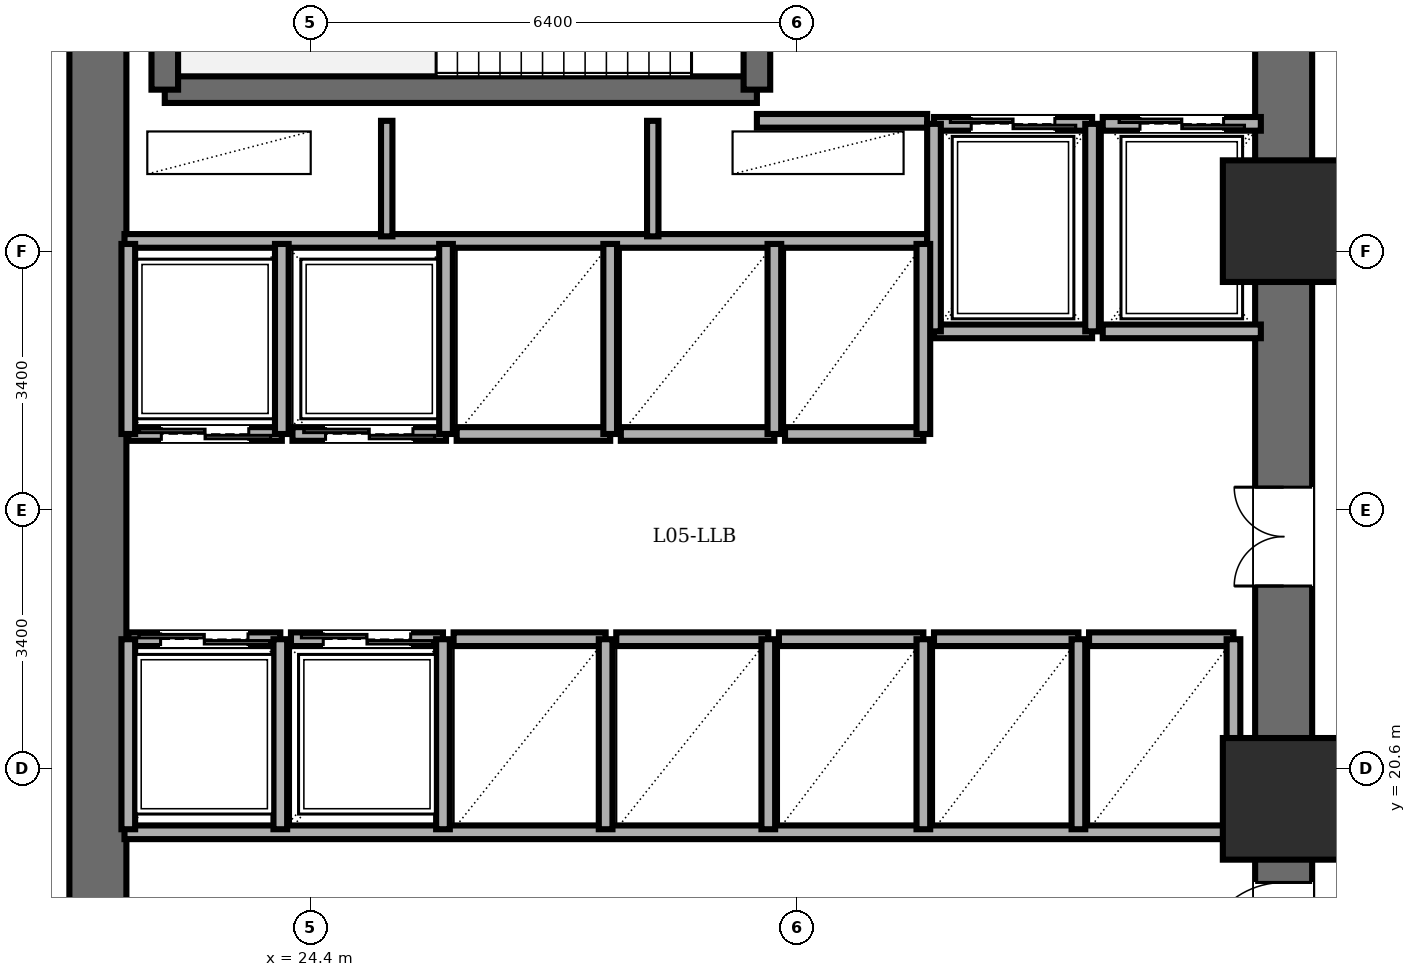
"""IFC4 building model, lengths in metres.
Left out: names, types, materials, properties, quantities, classifications, styles, units other than length and angle.
Written with IfcOpenShell. Run it as: python <this file> out.ifc"""

import sys

from ifc_helpers import new_model, si_unit, direction, frame, frame_2d, origin, origin_2d, place, context, subcontext, project, spatial, rectangle, extrude, element, fill, save


model = new_model("IFC4")
c1 = context("Model", 3, precision=1e-05, world=origin(), true_north=direction((0.0, 1.0)))
c2 = subcontext(c1, "Body", "Model", "MODEL_VIEW")
j1 = project(units=[si_unit("LENGTHUNIT", "METRE"), si_unit("PLANEANGLEUNIT", "RADIAN")], contexts=[c1])
p1 = place(None, origin())
s1 = spatial("IfcSite", under=j1, at=p1, CompositionType="ELEMENT")
p2 = place(p1, origin())
s2 = spatial("IfcBuilding", under=s1, at=p2, CompositionType="ELEMENT")
p3 = place(p2, frame((0.0, 0.0, 19.35)))
s3 = spatial("IfcBuildingStorey", under=s2, at=p3, CompositionType="ELEMENT", Elevation=19.35)
for number, where, z_axis, x_axis in (
    (1, (37.2, 20.2, 0.0), (0.0, 0.0, 1.0), (1.0, 0.0, 0.0)),
    (2, (37.2, 27.8, 0.0), (0.0, 0.0, 1.0), (1.0, 0.0, 0.0)),
):
    element("IfcColumn", number, at=place(p3, frame(where, z_axis=z_axis, x_axis=x_axis)), inside=s3, PredefinedType="COLUMN", context=c2, shape_type="SweptSolid", body=[
        extrude(rectangle(XDim=1.6, YDim=1.6, at=origin_2d()), origin(), (0.0, 0.0, 1.0), 4.65),
    ])
p4 = place(p3, frame((21.6, 14.4, 0.0), z_axis=(0.0, 0.0, 1.0), x_axis=(0.0, 1.0, 0.0)))
e3 = element("IfcWall", 3, at=p4, inside=s3, PredefinedType="SHEAR", context=c2, shape_type="SweptSolid", body=[
    extrude(rectangle(XDim=19.2, YDim=0.75, at=frame_2d((9.6, 0.0))), origin(), (0.0, 0.0, 1.0), 4.41),
])
p5 = place(p3, frame((37.2, 14.4, 0.0), z_axis=(0.0, 0.0, 1.0), x_axis=(0.0, 1.0, 0.0)))
e4 = element("IfcWall", 4, at=p5, inside=s3, PredefinedType="SHEAR", context=c2, shape_type="SweptSolid", body=[
    extrude(rectangle(XDim=19.2, YDim=0.75, at=frame_2d((9.6, 0.0))), origin(), (0.0, 0.0, 1.0), 4.41),
])
p6 = place(p5, frame((15.8, 0.0, 0.0)))
e5 = element("IfcOpeningElement", 5, at=p6, cuts=e4, PredefinedType="OPENING", context=c2, shape_type="SweptSolid", body=[
    extrude(rectangle(XDim=1.15, YDim=2.15, at=frame_2d((0.575, 1.075))), frame((0.0, 0.385, 0.0), z_axis=(0.0, -1.0, 0.0), x_axis=(1.0, 0.0, 0.0)), (0.0, 0.0, 1.0), 0.77),
])
p7 = place(p5, frame((3.6, 0.0, 0.0)))
e6 = element("IfcOpeningElement", 6, at=p7, cuts=e4, PredefinedType="OPENING", context=c2, shape_type="SweptSolid", body=[
    extrude(rectangle(XDim=1.1, YDim=2.15, at=frame_2d((0.55, 1.075))), frame((0.0, 0.385, 0.0), z_axis=(0.0, -1.0, 0.0), x_axis=(1.0, 0.0, 0.0)), (0.0, 0.0, 1.0), 0.77),
])
p8 = place(p5, frame((8.6, 0.0, 0.0)))
e7 = element("IfcOpeningElement", 7, at=p8, cuts=e4, PredefinedType="OPENING", context=c2, shape_type="SweptSolid", body=[
    extrude(rectangle(XDim=1.3, YDim=2.2, at=frame_2d((0.65, 1.1))), frame((0.0, 0.385, 0.0), z_axis=(0.0, -1.0, 0.0), x_axis=(1.0, 0.0, 0.0)), (0.0, 0.0, 1.0), 0.77),
])
p9 = place(p3, frame((22.48, 29.53, 0.0), z_axis=(0.0, 0.0, 1.0), x_axis=(1.0, 0.0, 0.0)))
e8 = element("IfcWall", 8, at=p9, inside=s3, PredefinedType="SOLIDWALL", context=c2, shape_type="SweptSolid", body=[
    extrude(rectangle(XDim=7.79, YDim=0.35, at=frame_2d((3.895, 0.0))), origin(), (0.0, 0.0, 1.0), 4.41),
])
p10 = place(p3, frame((22.48, 29.53, 0.0), z_axis=(0.0, 0.0, 1.0), x_axis=(0.0, 1.0, 0.0)))
e9 = element("IfcWall", 9, at=p10, inside=s3, PredefinedType="SOLIDWALL", context=c2, shape_type="SweptSolid", body=[
    extrude(rectangle(XDim=3.58, YDim=0.35, at=frame_2d((1.79, 0.0))), origin(), (0.0, 0.0, 1.0), 4.41),
])
p11 = place(p3, frame((30.27, 29.53, 0.0), z_axis=(0.0, 0.0, 1.0), x_axis=(0.0, 1.0, 0.0)))
e10 = element("IfcWall", 10, at=p11, inside=s3, PredefinedType="SOLIDWALL", context=c2, shape_type="SweptSolid", body=[
    extrude(rectangle(XDim=3.58, YDim=0.35, at=frame_2d((1.79, 0.0))), origin(), (0.0, 0.0, 1.0), 4.41),
])
p12 = place(p11, frame((1.25, 0.0, 0.0)))
e11 = element("IfcOpeningElement", 11, at=p12, cuts=e10, PredefinedType="OPENING", context=c2, shape_type="SweptSolid", body=[
    extrude(rectangle(XDim=1.1, YDim=2.15, at=frame_2d((0.55, 1.075))), frame((0.0, 0.185, 0.0), z_axis=(0.0, -1.0, 0.0), x_axis=(1.0, 0.0, 0.0)), (0.0, 0.0, 1.0), 0.37),
])
p13 = place(p3, frame((30.27, 29.12, 0.0), z_axis=(0.0, 0.0, 1.0), x_axis=(1.0, 0.0, 0.0)))
e12 = element("IfcWall", 12, at=p13, inside=s3, PredefinedType="PARTITIONING", context=c2, shape_type="SweptSolid", body=[
    extrude(rectangle(XDim=2.24, YDim=0.18, at=frame_2d((1.12, 0.0))), origin(), (0.0, 0.0, 1.0), 4.41),
])
p14 = place(p3, frame((21.95, 27.54, 0.0), z_axis=(0.0, 0.0, 1.0), x_axis=(1.0, 0.0, 0.0)))
e13 = element("IfcWall", 13, at=p14, inside=s3, PredefinedType="PARTITIONING", context=c2, shape_type="SweptSolid", body=[
    extrude(rectangle(XDim=10.56, YDim=0.18, at=frame_2d((5.28, 0.0))), origin(), (0.0, 0.0, 1.0), 4.41),
])
for number, where, z_axis, x_axis in (
    (14, (25.4, 27.6, 0.0), (0.0, 0.0, 1.0), (0.0, 1.0, 0.0)),
    (15, (28.9, 27.6, 0.0), (0.0, 0.0, 1.0), (0.0, 1.0, 0.0)),
):
    element("IfcWall", number, at=place(p3, frame(where, z_axis=z_axis, x_axis=x_axis)), inside=s3, PredefinedType="PARTITIONING", context=c2, shape_type="SweptSolid", body=[
        extrude(rectangle(XDim=1.52, YDim=0.15, at=frame_2d((0.76, 0.0))), origin(), (0.0, 0.0, 1.0), 4.41),
    ])
p15 = place(p3, frame((21.95, 19.76, 0.0), z_axis=(0.0, 0.0, 1.0), x_axis=(1.0, 0.0, 0.0)))
e16 = element("IfcWall", 16, at=p15, inside=s3, PredefinedType="PARTITIONING", context=c2, shape_type="SweptSolid", body=[
    extrude(rectangle(XDim=14.87, YDim=0.18, at=frame_2d((7.435, 0.0))), origin(), (0.0, 0.0, 1.0), 4.41),
])
p16 = place(p3, frame((32.6, 29.08, 0.0), z_axis=(0.0, 0.0, 1.0), x_axis=(1.0, 0.0, 0.0)))
e17 = element("IfcWall", 17, at=p16, inside=s3, PredefinedType="PARTITIONING", context=c2, shape_type="SweptSolid", body=[
    extrude(rectangle(XDim=2.08, YDim=0.18, at=frame_2d((1.04, 0.0))), origin(), (0.0, 0.0, 1.0), 4.41),
])
p17 = place(p16, frame((0.49, 0.0, 0.0)))
e18 = element("IfcOpeningElement", 18, at=p17, cuts=e17, PredefinedType="OPENING", context=c2, shape_type="SweptSolid", body=[
    extrude(rectangle(XDim=1.1, YDim=2.2, at=frame_2d((0.55, 1.1))), frame((0.0, 0.1, 0.0), z_axis=(0.0, -1.0, 0.0), x_axis=(1.0, 0.0, 0.0)), (0.0, 0.0, 1.0), 0.2),
])
p18 = place(p3, frame((34.68, 26.35, 0.0), z_axis=(0.0, 0.0, 1.0), x_axis=(-1.0, 0.0, 0.0)))
e19 = element("IfcWall", 19, at=p18, inside=s3, PredefinedType="PARTITIONING", context=c2, shape_type="SweptSolid", body=[
    extrude(rectangle(XDim=2.08, YDim=0.18, at=frame_2d((1.04, 0.0))), origin(), (0.0, 0.0, 1.0), 4.41),
])
for number, where, z_axis, x_axis in (
    (20, (34.68, 26.35, 0.0), (0.0, 0.0, 1.0), (0.0, 1.0, 0.0)),
    (21, (32.6, 29.08, 0.0), (0.0, 0.0, 1.0), (0.0, -1.0, 0.0)),
):
    element("IfcWall", number, at=place(p3, frame(where, z_axis=z_axis, x_axis=x_axis)), inside=s3, PredefinedType="PARTITIONING", context=c2, shape_type="SweptSolid", body=[
        extrude(rectangle(XDim=2.73, YDim=0.18, at=frame_2d((1.365, 0.0))), origin(), (0.0, 0.0, 1.0), 4.41),
    ])
p19 = place(p3, frame((34.82, 29.08, 0.0), z_axis=(0.0, 0.0, 1.0), x_axis=(1.0, 0.0, 0.0)))
e22 = element("IfcWall", 22, at=p19, inside=s3, PredefinedType="PARTITIONING", context=c2, shape_type="SweptSolid", body=[
    extrude(rectangle(XDim=2.08, YDim=0.18, at=frame_2d((1.04, 0.0))), origin(), (0.0, 0.0, 1.0), 4.41),
])
p20 = place(p19, frame((0.49, 0.0, 0.0)))
e23 = element("IfcOpeningElement", 23, at=p20, cuts=e22, PredefinedType="OPENING", context=c2, shape_type="SweptSolid", body=[
    extrude(rectangle(XDim=1.1, YDim=2.2, at=frame_2d((0.55, 1.1))), frame((0.0, 0.1, 0.0), z_axis=(0.0, -1.0, 0.0), x_axis=(1.0, 0.0, 0.0)), (0.0, 0.0, 1.0), 0.2),
])
p21 = place(p3, frame((36.9, 26.35, 0.0), z_axis=(0.0, 0.0, 1.0), x_axis=(-1.0, 0.0, 0.0)))
e24 = element("IfcWall", 24, at=p21, inside=s3, PredefinedType="PARTITIONING", context=c2, shape_type="SweptSolid", body=[
    extrude(rectangle(XDim=2.08, YDim=0.18, at=frame_2d((1.04, 0.0))), origin(), (0.0, 0.0, 1.0), 4.41),
])
p22 = place(p3, frame((24.02, 25.0, 0.0), z_axis=(0.0, 0.0, 1.0), x_axis=(-1.0, 0.0, 0.0)))
e25 = element("IfcWall", 25, at=p22, inside=s3, PredefinedType="PARTITIONING", context=c2, shape_type="SweptSolid", body=[
    extrude(rectangle(XDim=2.02, YDim=0.18, at=frame_2d((1.01, 0.0))), origin(), (0.0, 0.0, 1.0), 4.41),
])
p23 = place(p22, frame((0.435, 0.0, 0.0)))
e26 = element("IfcOpeningElement", 26, at=p23, cuts=e25, PredefinedType="OPENING", context=c2, shape_type="SweptSolid", body=[
    extrude(rectangle(XDim=1.15, YDim=2.2, at=frame_2d((0.575, 1.1))), frame((0.0, 0.1, 0.0), z_axis=(0.0, -1.0, 0.0), x_axis=(1.0, 0.0, 0.0)), (0.0, 0.0, 1.0), 0.2),
])
for number, where, z_axis, x_axis in (
    (27, (24.02, 25.0, 0.0), (0.0, 0.0, 1.0), (0.0, 1.0, 0.0)),
    (28, (22.0, 27.5, 0.0), (0.0, 0.0, 1.0), (0.0, -1.0, 0.0)),
):
    element("IfcWall", number, at=place(p3, frame(where, z_axis=z_axis, x_axis=x_axis)), inside=s3, PredefinedType="PARTITIONING", context=c2, shape_type="SweptSolid", body=[
        extrude(rectangle(XDim=2.5, YDim=0.18, at=frame_2d((1.25, 0.0))), origin(), (0.0, 0.0, 1.0), 4.41),
    ])
p24 = place(p3, frame((26.18, 25.0, 0.0), z_axis=(0.0, 0.0, 1.0), x_axis=(-1.0, 0.0, 0.0)))
e29 = element("IfcWall", 29, at=p24, inside=s3, PredefinedType="PARTITIONING", context=c2, shape_type="SweptSolid", body=[
    extrude(rectangle(XDim=2.02, YDim=0.18, at=frame_2d((1.01, 0.0))), origin(), (0.0, 0.0, 1.0), 4.41),
])
p25 = place(p24, frame((0.435, 0.0, 0.0)))
e30 = element("IfcOpeningElement", 30, at=p25, cuts=e29, PredefinedType="OPENING", context=c2, shape_type="SweptSolid", body=[
    extrude(rectangle(XDim=1.15, YDim=2.2, at=frame_2d((0.575, 1.1))), frame((0.0, 0.1, 0.0), z_axis=(0.0, -1.0, 0.0), x_axis=(1.0, 0.0, 0.0)), (0.0, 0.0, 1.0), 0.2),
])
p26 = place(p3, frame((26.18, 25.0, 0.0), z_axis=(0.0, 0.0, 1.0), x_axis=(0.0, 1.0, 0.0)))
e31 = element("IfcWall", 31, at=p26, inside=s3, PredefinedType="PARTITIONING", context=c2, shape_type="SweptSolid", body=[
    extrude(rectangle(XDim=2.5, YDim=0.18, at=frame_2d((1.25, 0.0))), origin(), (0.0, 0.0, 1.0), 4.41),
])
p27 = place(p3, frame((22.0, 22.3, 0.0), z_axis=(0.0, 0.0, 1.0), x_axis=(1.0, 0.0, 0.0)))
e32 = element("IfcWall", 32, at=p27, inside=s3, PredefinedType="PARTITIONING", context=c2, shape_type="SweptSolid", body=[
    extrude(rectangle(XDim=2.0, YDim=0.18, at=frame_2d((1.0, 0.0))), origin(), (0.0, 0.0, 1.0), 4.41),
])
p28 = place(p27, frame((0.425, 0.0, 0.0)))
e33 = element("IfcOpeningElement", 33, at=p28, cuts=e32, PredefinedType="OPENING", context=c2, shape_type="SweptSolid", body=[
    extrude(rectangle(XDim=1.15, YDim=2.2, at=frame_2d((0.575, 1.1))), frame((0.0, 0.1, 0.0), z_axis=(0.0, -1.0, 0.0), x_axis=(1.0, 0.0, 0.0)), (0.0, 0.0, 1.0), 0.2),
])
for number, where, z_axis, x_axis in (
    (34, (24.0, 19.8, 0.0), (0.0, 0.0, 1.0), (0.0, 1.0, 0.0)),
    (35, (22.0, 22.3, 0.0), (0.0, 0.0, 1.0), (0.0, -1.0, 0.0)),
):
    element("IfcWall", number, at=place(p3, frame(where, z_axis=z_axis, x_axis=x_axis)), inside=s3, PredefinedType="PARTITIONING", context=c2, shape_type="SweptSolid", body=[
        extrude(rectangle(XDim=2.5, YDim=0.18, at=frame_2d((1.25, 0.0))), origin(), (0.0, 0.0, 1.0), 4.41),
    ])
p29 = place(p3, frame((24.14, 22.3, 0.0), z_axis=(0.0, 0.0, 1.0), x_axis=(1.0, 0.0, 0.0)))
e36 = element("IfcWall", 36, at=p29, inside=s3, PredefinedType="PARTITIONING", context=c2, shape_type="SweptSolid", body=[
    extrude(rectangle(XDim=2.0, YDim=0.18, at=frame_2d((1.0, 0.0))), origin(), (0.0, 0.0, 1.0), 4.41),
])
p30 = place(p29, frame((0.425, 0.0, 0.0)))
e37 = element("IfcOpeningElement", 37, at=p30, cuts=e36, PredefinedType="OPENING", context=c2, shape_type="SweptSolid", body=[
    extrude(rectangle(XDim=1.15, YDim=2.2, at=frame_2d((0.575, 1.1))), frame((0.0, 0.1, 0.0), z_axis=(0.0, -1.0, 0.0), x_axis=(1.0, 0.0, 0.0)), (0.0, 0.0, 1.0), 0.2),
])
p31 = place(p3, frame((26.14, 19.8, 0.0), z_axis=(0.0, 0.0, 1.0), x_axis=(0.0, 1.0, 0.0)))
e38 = element("IfcWall", 38, at=p31, inside=s3, PredefinedType="PARTITIONING", context=c2, shape_type="SweptSolid", body=[
    extrude(rectangle(XDim=2.5, YDim=0.18, at=frame_2d((1.25, 0.0))), origin(), (0.0, 0.0, 1.0), 4.41),
])
p32 = place(p3, frame((28.34, 25.0, 0.0), z_axis=(0.0, 0.0, 1.0), x_axis=(-1.0, 0.0, 0.0)))
e39 = element("IfcWall", 39, at=p32, inside=s3, PredefinedType="PARTITIONING", context=c2, shape_type="SweptSolid", body=[
    extrude(rectangle(XDim=2.02, YDim=0.18, at=frame_2d((1.01, 0.0))), origin(), (0.0, 0.0, 1.0), 4.41),
])
p33 = place(p3, frame((28.34, 25.0, 0.0), z_axis=(0.0, 0.0, 1.0), x_axis=(0.0, 1.0, 0.0)))
e40 = element("IfcWall", 40, at=p33, inside=s3, PredefinedType="PARTITIONING", context=c2, shape_type="SweptSolid", body=[
    extrude(rectangle(XDim=2.5, YDim=0.18, at=frame_2d((1.25, 0.0))), origin(), (0.0, 0.0, 1.0), 4.41),
])
p34 = place(p3, frame((30.5, 25.0, 0.0), z_axis=(0.0, 0.0, 1.0), x_axis=(-1.0, 0.0, 0.0)))
e41 = element("IfcWall", 41, at=p34, inside=s3, PredefinedType="PARTITIONING", context=c2, shape_type="SweptSolid", body=[
    extrude(rectangle(XDim=2.02, YDim=0.18, at=frame_2d((1.01, 0.0))), origin(), (0.0, 0.0, 1.0), 4.41),
])
p35 = place(p3, frame((30.5, 25.0, 0.0), z_axis=(0.0, 0.0, 1.0), x_axis=(0.0, 1.0, 0.0)))
e42 = element("IfcWall", 42, at=p35, inside=s3, PredefinedType="PARTITIONING", context=c2, shape_type="SweptSolid", body=[
    extrude(rectangle(XDim=2.5, YDim=0.18, at=frame_2d((1.25, 0.0))), origin(), (0.0, 0.0, 1.0), 4.41),
])
p36 = place(p3, frame((26.28, 22.3, 0.0), z_axis=(0.0, 0.0, 1.0), x_axis=(1.0, 0.0, 0.0)))
e43 = element("IfcWall", 43, at=p36, inside=s3, PredefinedType="PARTITIONING", context=c2, shape_type="SweptSolid", body=[
    extrude(rectangle(XDim=2.0, YDim=0.18, at=frame_2d((1.0, 0.0))), origin(), (0.0, 0.0, 1.0), 4.41),
])
p37 = place(p3, frame((28.28, 19.8, 0.0), z_axis=(0.0, 0.0, 1.0), x_axis=(0.0, 1.0, 0.0)))
e44 = element("IfcWall", 44, at=p37, inside=s3, PredefinedType="PARTITIONING", context=c2, shape_type="SweptSolid", body=[
    extrude(rectangle(XDim=2.5, YDim=0.18, at=frame_2d((1.25, 0.0))), origin(), (0.0, 0.0, 1.0), 4.41),
])
p38 = place(p3, frame((28.42, 22.3, 0.0), z_axis=(0.0, 0.0, 1.0), x_axis=(1.0, 0.0, 0.0)))
e45 = element("IfcWall", 45, at=p38, inside=s3, PredefinedType="PARTITIONING", context=c2, shape_type="SweptSolid", body=[
    extrude(rectangle(XDim=2.0, YDim=0.18, at=frame_2d((1.0, 0.0))), origin(), (0.0, 0.0, 1.0), 4.41),
])
p39 = place(p3, frame((30.42, 19.8, 0.0), z_axis=(0.0, 0.0, 1.0), x_axis=(0.0, 1.0, 0.0)))
e46 = element("IfcWall", 46, at=p39, inside=s3, PredefinedType="PARTITIONING", context=c2, shape_type="SweptSolid", body=[
    extrude(rectangle(XDim=2.5, YDim=0.18, at=frame_2d((1.25, 0.0))), origin(), (0.0, 0.0, 1.0), 4.41),
])
p40 = place(p3, frame((32.46, 25.0, 0.0), z_axis=(0.0, 0.0, 1.0), x_axis=(-1.0, 0.0, 0.0)))
e47 = element("IfcWall", 47, at=p40, inside=s3, PredefinedType="PARTITIONING", context=c2, shape_type="SweptSolid", body=[
    extrude(rectangle(XDim=1.82, YDim=0.18, at=frame_2d((0.91, 0.0))), origin(), (0.0, 0.0, 1.0), 4.41),
])
p41 = place(p3, frame((32.46, 25.0, 0.0), z_axis=(0.0, 0.0, 1.0), x_axis=(0.0, 1.0, 0.0)))
e48 = element("IfcWall", 48, at=p41, inside=s3, PredefinedType="PARTITIONING", context=c2, shape_type="SweptSolid", body=[
    extrude(rectangle(XDim=2.5, YDim=0.18, at=frame_2d((1.25, 0.0))), origin(), (0.0, 0.0, 1.0), 4.41),
])
p42 = place(p3, frame((30.56, 22.3, 0.0), z_axis=(0.0, 0.0, 1.0), x_axis=(1.0, 0.0, 0.0)))
e49 = element("IfcWall", 49, at=p42, inside=s3, PredefinedType="PARTITIONING", context=c2, shape_type="SweptSolid", body=[
    extrude(rectangle(XDim=1.9, YDim=0.18, at=frame_2d((0.95, 0.0))), origin(), (0.0, 0.0, 1.0), 4.41),
])
p43 = place(p3, frame((32.46, 19.8, 0.0), z_axis=(0.0, 0.0, 1.0), x_axis=(0.0, 1.0, 0.0)))
e50 = element("IfcWall", 50, at=p43, inside=s3, PredefinedType="PARTITIONING", context=c2, shape_type="SweptSolid", body=[
    extrude(rectangle(XDim=2.5, YDim=0.18, at=frame_2d((1.25, 0.0))), origin(), (0.0, 0.0, 1.0), 4.41),
])
p44 = place(p3, frame((32.6, 22.3, 0.0), z_axis=(0.0, 0.0, 1.0), x_axis=(1.0, 0.0, 0.0)))
e51 = element("IfcWall", 51, at=p44, inside=s3, PredefinedType="PARTITIONING", context=c2, shape_type="SweptSolid", body=[
    extrude(rectangle(XDim=1.9, YDim=0.18, at=frame_2d((0.95, 0.0))), origin(), (0.0, 0.0, 1.0), 4.41),
])
p45 = place(p3, frame((34.5, 19.8, 0.0), z_axis=(0.0, 0.0, 1.0), x_axis=(0.0, 1.0, 0.0)))
e52 = element("IfcWall", 52, at=p45, inside=s3, PredefinedType="PARTITIONING", context=c2, shape_type="SweptSolid", body=[
    extrude(rectangle(XDim=2.5, YDim=0.18, at=frame_2d((1.25, 0.0))), origin(), (0.0, 0.0, 1.0), 4.41),
])
p46 = place(p3, frame((34.64, 22.3, 0.0), z_axis=(0.0, 0.0, 1.0), x_axis=(1.0, 0.0, 0.0)))
e53 = element("IfcWall", 53, at=p46, inside=s3, PredefinedType="PARTITIONING", context=c2, shape_type="SweptSolid", body=[
    extrude(rectangle(XDim=1.9, YDim=0.18, at=frame_2d((0.95, 0.0))), origin(), (0.0, 0.0, 1.0), 4.41),
])
p47 = place(p3, frame((36.54, 19.8, 0.0), z_axis=(0.0, 0.0, 1.0), x_axis=(0.0, 1.0, 0.0)))
e54 = element("IfcWall", 54, at=p47, inside=s3, PredefinedType="PARTITIONING", context=c2, shape_type="SweptSolid", body=[
    extrude(rectangle(XDim=2.5, YDim=0.18, at=frame_2d((1.25, 0.0))), origin(), (0.0, 0.0, 1.0), 4.41),
])
p48 = place(p7, origin())
e55 = element("IfcDoor", 55, at=p48, inside=s3, OperationType="SINGLE_SWING_LEFT", PredefinedType="DOOR", context=c2, shape_type="SweptSolid", body=[
    extrude(rectangle(XDim=1.1, YDim=2.15, at=frame_2d((0.55, 1.075))), frame((0.0, 0.025, 0.0), z_axis=(0.0, -1.0, 0.0), x_axis=(1.0, 0.0, 0.0)), (0.0, 0.0, 1.0), 0.05),
])
fill(e6, e55)
p49 = place(p17, origin())
e56 = element("IfcDoor", 56, at=p49, inside=s3, OperationType="DOUBLE_DOOR_SLIDING", PredefinedType="DOOR", context=c2, shape_type="SweptSolid", body=[
    extrude(rectangle(XDim=1.1, YDim=2.2, at=frame_2d((0.55, 1.1))), frame((0.0, 0.025, 0.0), z_axis=(0.0, -1.0, 0.0), x_axis=(1.0, 0.0, 0.0)), (0.0, 0.0, 1.0), 0.05),
])
fill(e18, e56)
p50 = place(p20, origin())
e57 = element("IfcDoor", 57, at=p50, inside=s3, OperationType="DOUBLE_DOOR_SLIDING", PredefinedType="DOOR", context=c2, shape_type="SweptSolid", body=[
    extrude(rectangle(XDim=1.1, YDim=2.2, at=frame_2d((0.55, 1.1))), frame((0.0, 0.025, 0.0), z_axis=(0.0, -1.0, 0.0), x_axis=(1.0, 0.0, 0.0)), (0.0, 0.0, 1.0), 0.05),
])
fill(e23, e57)
p51 = place(p23, origin())
e58 = element("IfcDoor", 58, at=p51, inside=s3, OperationType="DOUBLE_DOOR_SLIDING", PredefinedType="DOOR", context=c2, shape_type="SweptSolid", body=[
    extrude(rectangle(XDim=1.15, YDim=2.2, at=frame_2d((0.575, 1.1))), frame((0.0, 0.025, 0.0), z_axis=(0.0, -1.0, 0.0), x_axis=(1.0, 0.0, 0.0)), (0.0, 0.0, 1.0), 0.05),
])
fill(e26, e58)
p52 = place(p25, origin())
e59 = element("IfcDoor", 59, at=p52, inside=s3, OperationType="DOUBLE_DOOR_SLIDING", PredefinedType="DOOR", context=c2, shape_type="SweptSolid", body=[
    extrude(rectangle(XDim=1.15, YDim=2.2, at=frame_2d((0.575, 1.1))), frame((0.0, 0.025, 0.0), z_axis=(0.0, -1.0, 0.0), x_axis=(1.0, 0.0, 0.0)), (0.0, 0.0, 1.0), 0.05),
])
fill(e30, e59)
p53 = place(p28, origin())
e60 = element("IfcDoor", 60, at=p53, inside=s3, OperationType="DOUBLE_DOOR_SLIDING", PredefinedType="DOOR", context=c2, shape_type="SweptSolid", body=[
    extrude(rectangle(XDim=1.15, YDim=2.2, at=frame_2d((0.575, 1.1))), frame((0.0, 0.025, 0.0), z_axis=(0.0, -1.0, 0.0), x_axis=(1.0, 0.0, 0.0)), (0.0, 0.0, 1.0), 0.05),
])
fill(e33, e60)
p54 = place(p30, origin())
e61 = element("IfcDoor", 61, at=p54, inside=s3, OperationType="DOUBLE_DOOR_SLIDING", PredefinedType="DOOR", context=c2, shape_type="SweptSolid", body=[
    extrude(rectangle(XDim=1.15, YDim=2.2, at=frame_2d((0.575, 1.1))), frame((0.0, 0.025, 0.0), z_axis=(0.0, -1.0, 0.0), x_axis=(1.0, 0.0, 0.0)), (0.0, 0.0, 1.0), 0.05),
])
fill(e37, e61)
p55 = place(p8, origin())
e62 = element("IfcDoor", 62, at=p55, inside=s3, OperationType="DOUBLE_DOOR_SINGLE_SWING", PredefinedType="DOOR", context=c2, shape_type="SweptSolid", body=[
    extrude(rectangle(XDim=1.3, YDim=2.2, at=frame_2d((0.65, 1.1))), frame((0.0, 0.025, 0.0), z_axis=(0.0, -1.0, 0.0), x_axis=(1.0, 0.0, 0.0)), (0.0, 0.0, 1.0), 0.05),
])
fill(e7, e62)
save(model, sys.argv[1])
